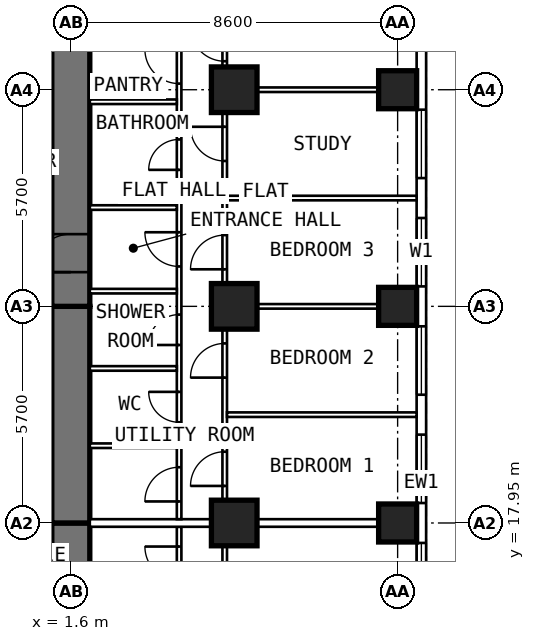
"""IFC4 building model, lengths in metres.
Left out: names, types, materials, properties, quantities, classifications, styles, units other than length and angle.
Written with IfcOpenShell. Run it as: python <this file> out.ifc"""

import sys

from ifc_helpers import new_model, si_unit, direction, frame, frame_2d, origin, origin_2d, place, context, subcontext, project, spatial, rectangle, extrude, element, fill, save


model = new_model("IFC4")
c1 = context("Model", 3, precision=1e-05, world=origin(), true_north=direction((0.0, 1.0)))
c2 = subcontext(c1, "Body", "Model", "MODEL_VIEW")
j1 = project(units=[si_unit("LENGTHUNIT", "METRE"), si_unit("PLANEANGLEUNIT", "RADIAN")], contexts=[c1])
p1 = place(None, origin())
s1 = spatial("IfcSite", under=j1, at=p1, CompositionType="ELEMENT")
p2 = place(p1, origin())
s2 = spatial("IfcBuilding", under=s1, at=p2, CompositionType="ELEMENT")
p3 = place(p2, frame((0.0, 0.0, 46.6)))
s3 = spatial("IfcBuildingStorey", under=s2, at=p3, CompositionType="ELEMENT", Elevation=46.6)
for number, where, z_axis, x_axis in (
    (1, (10.2, 17.95, 0.0), (0.0, 0.0, 1.0), (0.0, 1.0, 0.0)),
    (2, (10.2, 23.65, 0.0), (0.0, 0.0, 1.0), (0.0, 1.0, 0.0)),
    (3, (10.2, 29.35, 0.0), (0.0, 0.0, 1.0), (0.0, 1.0, 0.0)),
):
    element("IfcColumn", number, at=place(p3, frame(where, z_axis=z_axis, x_axis=x_axis)), inside=s3, PredefinedType="COLUMN", context=c2, shape_type="SweptSolid", body=[
        extrude(rectangle(XDim=1.0, YDim=1.0, at=origin_2d()), origin(), (0.0, 0.0, 1.0), 3.6),
    ])
for number, where, z_axis, x_axis in (
    (4, (5.9, 17.95, 0.0), (0.0, 0.0, 1.0), (0.0, 1.0, 0.0)),
    (5, (5.9, 23.65, 0.0), (0.0, 0.0, 1.0), (0.0, 1.0, 0.0)),
    (6, (5.9, 29.35, 0.0), (0.0, 0.0, 1.0), (0.0, 1.0, 0.0)),
):
    element("IfcColumn", number, at=place(p3, frame(where, z_axis=z_axis, x_axis=x_axis)), inside=s3, PredefinedType="COLUMN", context=c2, shape_type="SweptSolid", body=[
        extrude(rectangle(XDim=1.2, YDim=1.2, at=origin_2d()), origin(), (0.0, 0.0, 1.0), 3.6),
    ])
p4 = place(p3, frame((1.6, 9.6, 0.0), z_axis=(0.0, 0.0, 1.0), x_axis=(0.0, 1.0, 0.0)))
e7 = element("IfcWall", 7, at=p4, inside=s3, PredefinedType="SHEAR", context=c2, shape_type="SweptSolid", body=[
    extrude(rectangle(XDim=8.35, YDim=1.0, at=frame_2d((4.175, 0.0))), origin(), (0.0, 0.0, 1.0), 3.6),
])
p5 = place(p4, frame((1.3, 0.0, 0.0)))
e8 = element("IfcOpeningElement", 8, at=p5, cuts=e7, PredefinedType="OPENING", context=c2, shape_type="SweptSolid", body=[
    extrude(rectangle(XDim=1.0, YDim=2.1, at=frame_2d((0.5, 1.05))), frame((0.0, 0.512, 0.0), z_axis=(0.0, -1.0, 0.0), x_axis=(1.0, 0.0, 0.0)), (0.0, 0.0, 1.0), 1.024),
])
p6 = place(p3, frame((1.6, 17.95, 0.0), z_axis=(0.0, 0.0, 1.0), x_axis=(0.0, 1.0, 0.0)))
e9 = element("IfcWall", 9, at=p6, inside=s3, PredefinedType="SHEAR", context=c2, shape_type="SweptSolid", body=[
    extrude(rectangle(XDim=5.7, YDim=1.0, at=frame_2d((2.85, 0.0))), origin(), (0.0, 0.0, 1.0), 3.6),
])
p7 = place(p3, frame((1.6, 23.65, 0.0), z_axis=(0.0, 0.0, 1.0), x_axis=(0.0, 1.0, 0.0)))
e10 = element("IfcWall", 10, at=p7, inside=s3, PredefinedType="SHEAR", context=c2, shape_type="SweptSolid", body=[
    extrude(rectangle(XDim=10.745, YDim=1.0, at=frame_2d((5.373, 0.0))), origin(), (0.0, 0.0, 1.0), 3.6),
])
p8 = place(p7, frame((0.9, 0.0, 0.0)))
e11 = element("IfcOpeningElement", 11, at=p8, cuts=e10, PredefinedType="OPENING", context=c2, shape_type="SweptSolid", body=[
    extrude(rectangle(XDim=1.0, YDim=2.1, at=frame_2d((0.5, 1.05))), frame((0.0, 0.512, 0.0), z_axis=(0.0, -1.0, 0.0), x_axis=(1.0, 0.0, 0.0)), (0.0, 0.0, 1.0), 1.024),
])
p9 = place(p3, frame((10.825, 6.394, 0.0), z_axis=(0.0, 0.0, 1.0), x_axis=(0.0, 1.0, 0.0)))
e12 = element("IfcWall", 12, at=p9, inside=s3, PredefinedType="SOLIDWALL", context=c2, shape_type="SweptSolid", body=[
    extrude(rectangle(XDim=25.241, YDim=0.25, at=frame_2d((12.621, 0.0))), origin(), (0.0, 0.0, 1.0), 3.35),
])
p10 = place(p9, frame((0.681, 0.0, 0.8)))
e13 = element("IfcOpeningElement", 13, at=p10, cuts=e12, PredefinedType="OPENING", context=c2, shape_type="SweptSolid", body=[
    extrude(rectangle(XDim=1.8, YDim=1.8, at=frame_2d((0.9, 0.9))), frame((0.0, 0.137, 0.0), z_axis=(0.0, -1.0, 0.0), x_axis=(1.0, 0.0, 0.0)), (0.0, 0.0, 1.0), 0.274),
])
p11 = place(p9, frame((3.531, 0.0, 0.8)))
e14 = element("IfcOpeningElement", 14, at=p11, cuts=e12, PredefinedType="OPENING", context=c2, shape_type="SweptSolid", body=[
    extrude(rectangle(XDim=1.8, YDim=1.8, at=frame_2d((0.9, 0.9))), frame((0.0, 0.137, 0.0), z_axis=(0.0, -1.0, 0.0), x_axis=(1.0, 0.0, 0.0)), (0.0, 0.0, 1.0), 0.274),
])
p12 = place(p9, frame((6.381, 0.0, 0.8)))
e15 = element("IfcOpeningElement", 15, at=p12, cuts=e12, PredefinedType="OPENING", context=c2, shape_type="SweptSolid", body=[
    extrude(rectangle(XDim=1.8, YDim=1.8, at=frame_2d((0.9, 0.9))), frame((0.0, 0.137, 0.0), z_axis=(0.0, -1.0, 0.0), x_axis=(1.0, 0.0, 0.0)), (0.0, 0.0, 1.0), 0.274),
])
p13 = place(p9, frame((9.231, 0.0, 0.8)))
e16 = element("IfcOpeningElement", 16, at=p13, cuts=e12, PredefinedType="OPENING", context=c2, shape_type="SweptSolid", body=[
    extrude(rectangle(XDim=1.8, YDim=1.8, at=frame_2d((0.9, 0.9))), frame((0.0, 0.137, 0.0), z_axis=(0.0, -1.0, 0.0), x_axis=(1.0, 0.0, 0.0)), (0.0, 0.0, 1.0), 0.274),
])
p14 = place(p9, frame((12.081, 0.0, 0.8)))
e17 = element("IfcOpeningElement", 17, at=p14, cuts=e12, PredefinedType="OPENING", context=c2, shape_type="SweptSolid", body=[
    extrude(rectangle(XDim=1.8, YDim=1.8, at=frame_2d((0.9, 0.9))), frame((0.0, 0.137, 0.0), z_axis=(0.0, -1.0, 0.0), x_axis=(1.0, 0.0, 0.0)), (0.0, 0.0, 1.0), 0.274),
])
p15 = place(p9, frame((14.931, 0.0, 0.8)))
e18 = element("IfcOpeningElement", 18, at=p15, cuts=e12, PredefinedType="OPENING", context=c2, shape_type="SweptSolid", body=[
    extrude(rectangle(XDim=1.8, YDim=1.8, at=frame_2d((0.9, 0.9))), frame((0.0, 0.137, 0.0), z_axis=(0.0, -1.0, 0.0), x_axis=(1.0, 0.0, 0.0)), (0.0, 0.0, 1.0), 0.274),
])
p16 = place(p9, frame((17.781, 0.0, 0.8)))
e19 = element("IfcOpeningElement", 19, at=p16, cuts=e12, PredefinedType="OPENING", context=c2, shape_type="SweptSolid", body=[
    extrude(rectangle(XDim=1.8, YDim=1.8, at=frame_2d((0.9, 0.9))), frame((0.0, 0.137, 0.0), z_axis=(0.0, -1.0, 0.0), x_axis=(1.0, 0.0, 0.0)), (0.0, 0.0, 1.0), 0.274),
])
p17 = place(p9, frame((20.631, 0.0, 0.8)))
e20 = element("IfcOpeningElement", 20, at=p17, cuts=e12, PredefinedType="OPENING", context=c2, shape_type="SweptSolid", body=[
    extrude(rectangle(XDim=1.8, YDim=1.8, at=frame_2d((0.9, 0.9))), frame((0.0, 0.137, 0.0), z_axis=(0.0, -1.0, 0.0), x_axis=(1.0, 0.0, 0.0)), (0.0, 0.0, 1.0), 0.274),
])
p18 = place(p3, frame((4.45, 10.1, 0.0), z_axis=(0.0, 0.0, 1.0), x_axis=(0.0, 1.0, 0.0)))
e21 = element("IfcWall", 21, at=p18, inside=s3, PredefinedType="PARTITIONING", context=c2, shape_type="SweptSolid", body=[
    extrude(rectangle(XDim=7.75, YDim=0.12, at=frame_2d((3.875, 0.0))), origin(), (0.0, 0.0, 1.0), 3.35),
])
p19 = place(p18, frame((0.75, 0.0, 0.0)))
e22 = element("IfcOpeningElement", 22, at=p19, cuts=e21, PredefinedType="OPENING", context=c2, shape_type="SweptSolid", body=[
    extrude(rectangle(XDim=0.9, YDim=2.1, at=frame_2d((0.45, 1.05))), frame((0.0, 0.072, 0.0), z_axis=(0.0, -1.0, 0.0), x_axis=(1.0, 0.0, 0.0)), (0.0, 0.0, 1.0), 0.144),
])
p20 = place(p18, frame((3.705, 0.0, 0.0)))
e23 = element("IfcOpeningElement", 23, at=p20, cuts=e21, PredefinedType="OPENING", context=c2, shape_type="SweptSolid", body=[
    extrude(rectangle(XDim=0.8, YDim=2.1, at=frame_2d((0.4, 1.05))), frame((0.0, 0.072, 0.0), z_axis=(0.0, -1.0, 0.0), x_axis=(1.0, 0.0, 0.0)), (0.0, 0.0, 1.0), 0.144),
])
p21 = place(p18, frame((6.33, 0.0, 0.0)))
e24 = element("IfcOpeningElement", 24, at=p21, cuts=e21, PredefinedType="OPENING", context=c2, shape_type="SweptSolid", body=[
    extrude(rectangle(XDim=0.9, YDim=2.1, at=frame_2d((0.45, 1.05))), frame((0.0, 0.072, 0.0), z_axis=(0.0, -1.0, 0.0), x_axis=(1.0, 0.0, 0.0)), (0.0, 0.0, 1.0), 0.144),
])
p22 = place(p3, frame((5.65, 9.6, 0.0), z_axis=(0.0, 0.0, 1.0), x_axis=(0.0, 1.0, 0.0)))
e25 = element("IfcWall", 25, at=p22, inside=s3, PredefinedType="PARTITIONING", context=c2, shape_type="SweptSolid", body=[
    extrude(rectangle(XDim=8.1, YDim=0.12, at=frame_2d((4.05, 0.0))), origin(), (0.0, 0.0, 1.0), 3.35),
])
p23 = place(p22, frame((5.05, 0.0, 0.0)))
e26 = element("IfcOpeningElement", 26, at=p23, cuts=e25, PredefinedType="OPENING", context=c2, shape_type="SweptSolid", body=[
    extrude(rectangle(XDim=0.9, YDim=2.1, at=frame_2d((0.45, 1.05))), frame((0.0, 0.072, 0.0), z_axis=(0.0, -1.0, 0.0), x_axis=(1.0, 0.0, 0.0)), (0.0, 0.0, 1.0), 0.144),
])
p24 = place(p3, frame((4.45, 18.05, 0.0), z_axis=(0.0, 0.0, 1.0), x_axis=(0.0, 1.0, 0.0)))
e27 = element("IfcWall", 27, at=p24, inside=s3, PredefinedType="PARTITIONING", context=c2, shape_type="SweptSolid", body=[
    extrude(rectangle(XDim=16.345, YDim=0.12, at=frame_2d((8.172, 0.0))), origin(), (0.0, 0.0, 1.0), 3.35),
])
p25 = place(p24, frame((0.467, 0.0, 0.0)))
e28 = element("IfcOpeningElement", 28, at=p25, cuts=e27, PredefinedType="OPENING", context=c2, shape_type="SweptSolid", body=[
    extrude(rectangle(XDim=0.9, YDim=2.1, at=frame_2d((0.45, 1.05))), frame((0.0, 0.072, 0.0), z_axis=(0.0, -1.0, 0.0), x_axis=(1.0, 0.0, 0.0)), (0.0, 0.0, 1.0), 0.144),
])
p26 = place(p24, frame((2.55, 0.0, 0.0)))
e29 = element("IfcOpeningElement", 29, at=p26, cuts=e27, PredefinedType="OPENING", context=c2, shape_type="SweptSolid", body=[
    extrude(rectangle(XDim=0.8, YDim=2.1, at=frame_2d((0.4, 1.05))), frame((0.0, 0.072, 0.0), z_axis=(0.0, -1.0, 0.0), x_axis=(1.0, 0.0, 0.0)), (0.0, 0.0, 1.0), 0.144),
])
p27 = place(p24, frame((4.583, 0.0, 0.0)))
e30 = element("IfcOpeningElement", 30, at=p27, cuts=e27, PredefinedType="OPENING", context=c2, shape_type="SweptSolid", body=[
    extrude(rectangle(XDim=0.8, YDim=2.1, at=frame_2d((0.4, 1.05))), frame((0.0, 0.072, 0.0), z_axis=(0.0, -1.0, 0.0), x_axis=(1.0, 0.0, 0.0)), (0.0, 0.0, 1.0), 0.144),
])
p28 = place(p24, frame((6.65, 0.0, 0.0)))
e31 = element("IfcOpeningElement", 31, at=p28, cuts=e27, PredefinedType="OPENING", context=c2, shape_type="SweptSolid", body=[
    extrude(rectangle(XDim=0.9, YDim=2.1, at=frame_2d((0.45, 1.05))), frame((0.0, 0.072, 0.0), z_axis=(0.0, -1.0, 0.0), x_axis=(1.0, 0.0, 0.0)), (0.0, 0.0, 1.0), 0.144),
])
p29 = place(p24, frame((9.192, 0.0, 0.0)))
e32 = element("IfcOpeningElement", 32, at=p29, cuts=e27, PredefinedType="OPENING", context=c2, shape_type="SweptSolid", body=[
    extrude(rectangle(XDim=0.8, YDim=2.1, at=frame_2d((0.4, 1.05))), frame((0.0, 0.072, 0.0), z_axis=(0.0, -1.0, 0.0), x_axis=(1.0, 0.0, 0.0)), (0.0, 0.0, 1.0), 0.144),
])
p30 = place(p24, frame((11.461, 0.0, 0.0)))
e33 = element("IfcOpeningElement", 33, at=p30, cuts=e27, PredefinedType="OPENING", context=c2, shape_type="SweptSolid", body=[
    extrude(rectangle(XDim=0.9, YDim=2.1, at=frame_2d((0.45, 1.05))), frame((0.0, 0.072, 0.0), z_axis=(0.0, -1.0, 0.0), x_axis=(1.0, 0.0, 0.0)), (0.0, 0.0, 1.0), 0.144),
])
p31 = place(p24, frame((13.367, 0.0, 0.0)))
e34 = element("IfcOpeningElement", 34, at=p31, cuts=e27, PredefinedType="OPENING", context=c2, shape_type="SweptSolid", body=[
    extrude(rectangle(XDim=0.8, YDim=2.1, at=frame_2d((0.4, 1.05))), frame((0.0, 0.072, 0.0), z_axis=(0.0, -1.0, 0.0), x_axis=(1.0, 0.0, 0.0)), (0.0, 0.0, 1.0), 0.144),
])
p32 = place(p24, frame((14.854, 0.0, 0.0)))
e35 = element("IfcOpeningElement", 35, at=p32, cuts=e27, PredefinedType="OPENING", context=c2, shape_type="SweptSolid", body=[
    extrude(rectangle(XDim=0.9, YDim=2.1, at=frame_2d((0.45, 1.05))), frame((0.0, 0.072, 0.0), z_axis=(0.0, -1.0, 0.0), x_axis=(1.0, 0.0, 0.0)), (0.0, 0.0, 1.0), 0.144),
])
p33 = place(p3, frame((5.65, 18.05, 0.0), z_axis=(0.0, 0.0, 1.0), x_axis=(0.0, 1.0, 0.0)))
e36 = element("IfcWall", 36, at=p33, inside=s3, PredefinedType="PARTITIONING", context=c2, shape_type="SweptSolid", body=[
    extrude(rectangle(XDim=16.345, YDim=0.12, at=frame_2d((8.172, 0.0))), origin(), (0.0, 0.0, 1.0), 3.35),
])
p34 = place(p33, frame((0.875, 0.0, 0.0)))
e37 = element("IfcOpeningElement", 37, at=p34, cuts=e36, PredefinedType="OPENING", context=c2, shape_type="SweptSolid", body=[
    extrude(rectangle(XDim=0.9, YDim=2.1, at=frame_2d((0.45, 1.05))), frame((0.0, 0.072, 0.0), z_axis=(0.0, -1.0, 0.0), x_axis=(1.0, 0.0, 0.0)), (0.0, 0.0, 1.0), 0.144),
])
p35 = place(p33, frame((3.725, 0.0, 0.0)))
e38 = element("IfcOpeningElement", 38, at=p35, cuts=e36, PredefinedType="OPENING", context=c2, shape_type="SweptSolid", body=[
    extrude(rectangle(XDim=0.9, YDim=2.1, at=frame_2d((0.45, 1.05))), frame((0.0, 0.072, 0.0), z_axis=(0.0, -1.0, 0.0), x_axis=(1.0, 0.0, 0.0)), (0.0, 0.0, 1.0), 0.144),
])
p36 = place(p33, frame((6.575, 0.0, 0.0)))
e39 = element("IfcOpeningElement", 39, at=p36, cuts=e36, PredefinedType="OPENING", context=c2, shape_type="SweptSolid", body=[
    extrude(rectangle(XDim=0.9, YDim=2.1, at=frame_2d((0.45, 1.05))), frame((0.0, 0.072, 0.0), z_axis=(0.0, -1.0, 0.0), x_axis=(1.0, 0.0, 0.0)), (0.0, 0.0, 1.0), 0.144),
])
p37 = place(p33, frame((9.425, 0.0, 0.0)))
e40 = element("IfcOpeningElement", 40, at=p37, cuts=e36, PredefinedType="OPENING", context=c2, shape_type="SweptSolid", body=[
    extrude(rectangle(XDim=0.9, YDim=2.1, at=frame_2d((0.45, 1.05))), frame((0.0, 0.072, 0.0), z_axis=(0.0, -1.0, 0.0), x_axis=(1.0, 0.0, 0.0)), (0.0, 0.0, 1.0), 0.144),
])
p38 = place(p33, frame((12.05, 0.0, 0.0)))
e41 = element("IfcOpeningElement", 41, at=p38, cuts=e36, PredefinedType="OPENING", context=c2, shape_type="SweptSolid", body=[
    extrude(rectangle(XDim=0.9, YDim=2.1, at=frame_2d((0.45, 1.05))), frame((0.0, 0.072, 0.0), z_axis=(0.0, -1.0, 0.0), x_axis=(1.0, 0.0, 0.0)), (0.0, 0.0, 1.0), 0.144),
])
p39 = place(p3, frame((5.71, 20.8, 0.0), z_axis=(0.0, 0.0, 1.0), x_axis=(1.0, 0.0, 0.0)))
e42 = element("IfcWall", 42, at=p39, inside=s3, PredefinedType="PARTITIONING", context=c2, shape_type="SweptSolid", body=[
    extrude(rectangle(XDim=4.99, YDim=0.12, at=frame_2d((2.495, 0.0))), origin(), (0.0, 0.0, 1.0), 3.35),
])
p40 = place(p3, frame((5.71, 23.65, 0.0), z_axis=(0.0, 0.0, 1.0), x_axis=(1.0, 0.0, 0.0)))
e43 = element("IfcWall", 43, at=p40, inside=s3, PredefinedType="PARTITIONING", context=c2, shape_type="SweptSolid", body=[
    extrude(rectangle(XDim=4.99, YDim=0.12, at=frame_2d((2.495, 0.0))), origin(), (0.0, 0.0, 1.0), 2.45),
])
p41 = place(p3, frame((5.71, 26.5, 0.0), z_axis=(0.0, 0.0, 1.0), x_axis=(1.0, 0.0, 0.0)))
e44 = element("IfcWall", 44, at=p41, inside=s3, PredefinedType="PARTITIONING", context=c2, shape_type="SweptSolid", body=[
    extrude(rectangle(XDim=4.99, YDim=0.12, at=frame_2d((2.495, 0.0))), origin(), (0.0, 0.0, 1.0), 3.35),
])
p42 = place(p3, frame((5.71, 29.35, 0.0), z_axis=(0.0, 0.0, 1.0), x_axis=(1.0, 0.0, 0.0)))
e45 = element("IfcWall", 45, at=p42, inside=s3, PredefinedType="PARTITIONING", context=c2, shape_type="SweptSolid", body=[
    extrude(rectangle(XDim=4.99, YDim=0.12, at=frame_2d((2.495, 0.0))), origin(), (0.0, 0.0, 1.0), 2.45),
])
for number, where, z_axis, x_axis in (
    (46, (2.1, 19.983, 0.0), (0.0, 0.0, 1.0), (1.0, 0.0, 0.0)),
    (47, (2.1, 22.017, 0.0), (0.0, 0.0, 1.0), (1.0, 0.0, 0.0)),
    (48, (2.1, 24.05, 0.0), (0.0, 0.0, 1.0), (1.0, 0.0, 0.0)),
    (49, (2.1, 26.25, 0.0), (0.0, 0.0, 1.0), (1.0, 0.0, 0.0)),
):
    element("IfcWall", number, at=place(p3, frame(where, z_axis=z_axis, x_axis=x_axis)), inside=s3, PredefinedType="PARTITIONING", context=c2, shape_type="SweptSolid", body=[
        extrude(rectangle(XDim=2.29, YDim=0.12, at=frame_2d((1.145, 0.0))), origin(), (0.0, 0.0, 1.0), 3.35),
    ])
p43 = place(p3, frame((2.1, 29.033, 0.0), z_axis=(0.0, 0.0, 1.0), x_axis=(1.0, 0.0, 0.0)))
e50 = element("IfcWall", 50, at=p43, inside=s3, PredefinedType="PARTITIONING", context=c2, shape_type="SweptSolid", body=[
    extrude(rectangle(XDim=2.29, YDim=0.12, at=frame_2d((1.145, 0.0))), origin(), (0.0, 0.0, 1.0), 2.45),
])
p44 = place(p3, frame((2.1, 17.95, 0.0), z_axis=(0.0, 0.0, 1.0), x_axis=(1.0, 0.0, 0.0)))
e51 = element("IfcWall", 51, at=p44, inside=s3, PredefinedType="PARTITIONING", context=c2, shape_type="SweptSolid", body=[
    extrude(rectangle(XDim=8.6, YDim=0.2, at=frame_2d((4.3, 0.0))), origin(), (0.0, 0.0, 1.0), 2.45),
])
p45 = place(p13, origin())
e52 = element("IfcWindow", 52, at=p45, inside=s3, PartitioningType="SINGLE_PANEL", PredefinedType="WINDOW", context=c2, shape_type="SweptSolid", body=[
    extrude(rectangle(XDim=1.8, YDim=1.8, at=frame_2d((0.9, 0.9))), frame((0.0, 0.03, 0.0), z_axis=(0.0, -1.0, 0.0), x_axis=(1.0, 0.0, 0.0)), (0.0, 0.0, 1.0), 0.06),
])
fill(e16, e52)
p46 = place(p14, origin())
e53 = element("IfcWindow", 53, at=p46, inside=s3, PartitioningType="SINGLE_PANEL", PredefinedType="WINDOW", context=c2, shape_type="SweptSolid", body=[
    extrude(rectangle(XDim=1.8, YDim=1.8, at=frame_2d((0.9, 0.9))), frame((0.0, 0.03, 0.0), z_axis=(0.0, -1.0, 0.0), x_axis=(1.0, 0.0, 0.0)), (0.0, 0.0, 1.0), 0.06),
])
fill(e17, e53)
p47 = place(p15, origin())
e54 = element("IfcWindow", 54, at=p47, inside=s3, PartitioningType="SINGLE_PANEL", PredefinedType="WINDOW", context=c2, shape_type="SweptSolid", body=[
    extrude(rectangle(XDim=1.8, YDim=1.8, at=frame_2d((0.9, 0.9))), frame((0.0, 0.03, 0.0), z_axis=(0.0, -1.0, 0.0), x_axis=(1.0, 0.0, 0.0)), (0.0, 0.0, 1.0), 0.06),
])
fill(e18, e54)
p48 = place(p16, origin())
e55 = element("IfcWindow", 55, at=p48, inside=s3, PartitioningType="SINGLE_PANEL", PredefinedType="WINDOW", context=c2, shape_type="SweptSolid", body=[
    extrude(rectangle(XDim=1.8, YDim=1.8, at=frame_2d((0.9, 0.9))), frame((0.0, 0.03, 0.0), z_axis=(0.0, -1.0, 0.0), x_axis=(1.0, 0.0, 0.0)), (0.0, 0.0, 1.0), 0.06),
])
fill(e19, e55)
p49 = place(p17, origin())
e56 = element("IfcWindow", 56, at=p49, inside=s3, PartitioningType="SINGLE_PANEL", PredefinedType="WINDOW", context=c2, shape_type="SweptSolid", body=[
    extrude(rectangle(XDim=1.8, YDim=1.8, at=frame_2d((0.9, 0.9))), frame((0.0, 0.03, 0.0), z_axis=(0.0, -1.0, 0.0), x_axis=(1.0, 0.0, 0.0)), (0.0, 0.0, 1.0), 0.06),
])
fill(e20, e56)
p50 = place(p21, origin())
e57 = element("IfcDoor", 57, at=p50, inside=s3, OperationType="SINGLE_SWING_RIGHT", PredefinedType="DOOR", context=c2, shape_type="SweptSolid", body=[
    extrude(rectangle(XDim=0.9, YDim=2.1, at=frame_2d((0.45, 1.05))), frame((0.0, 0.025, 0.0), z_axis=(0.0, -1.0, 0.0), x_axis=(1.0, 0.0, 0.0)), (0.0, 0.0, 1.0), 0.05),
])
fill(e24, e57)
p51 = place(p8, origin())
e58 = element("IfcDoor", 58, at=p51, inside=s3, OperationType="SINGLE_SWING_LEFT", PredefinedType="DOOR", context=c2, shape_type="SweptSolid", body=[
    extrude(rectangle(XDim=1.0, YDim=2.1, at=frame_2d((0.5, 1.05))), frame((0.0, 0.25, 0.0), z_axis=(0.0, -1.0, 0.0), x_axis=(1.0, 0.0, 0.0)), (0.0, 0.0, 1.0), 0.5),
])
fill(e11, e58)
p52 = place(p34, origin())
e59 = element("IfcDoor", 59, at=p52, inside=s3, OperationType="SINGLE_SWING_LEFT", PredefinedType="DOOR", context=c2, shape_type="SweptSolid", body=[
    extrude(rectangle(XDim=0.9, YDim=2.1, at=frame_2d((0.45, 1.05))), frame((0.0, 0.025, 0.0), z_axis=(0.0, -1.0, 0.0), x_axis=(1.0, 0.0, 0.0)), (0.0, 0.0, 1.0), 0.05),
])
fill(e37, e59)
p53 = place(p35, origin())
e60 = element("IfcDoor", 60, at=p53, inside=s3, OperationType="SINGLE_SWING_LEFT", PredefinedType="DOOR", context=c2, shape_type="SweptSolid", body=[
    extrude(rectangle(XDim=0.9, YDim=2.1, at=frame_2d((0.45, 1.05))), frame((0.0, 0.025, 0.0), z_axis=(0.0, -1.0, 0.0), x_axis=(1.0, 0.0, 0.0)), (0.0, 0.0, 1.0), 0.05),
])
fill(e38, e60)
p54 = place(p36, origin())
e61 = element("IfcDoor", 61, at=p54, inside=s3, OperationType="SINGLE_SWING_LEFT", PredefinedType="DOOR", context=c2, shape_type="SweptSolid", body=[
    extrude(rectangle(XDim=0.9, YDim=2.1, at=frame_2d((0.45, 1.05))), frame((0.0, 0.025, 0.0), z_axis=(0.0, -1.0, 0.0), x_axis=(1.0, 0.0, 0.0)), (0.0, 0.0, 1.0), 0.05),
])
fill(e39, e61)
p55 = place(p37, origin())
e62 = element("IfcDoor", 62, at=p55, inside=s3, OperationType="SINGLE_SWING_RIGHT", PredefinedType="DOOR", context=c2, shape_type="SweptSolid", body=[
    extrude(rectangle(XDim=0.9, YDim=2.1, at=frame_2d((0.45, 1.05))), frame((0.0, 0.025, 0.0), z_axis=(0.0, -1.0, 0.0), x_axis=(1.0, 0.0, 0.0)), (0.0, 0.0, 1.0), 0.05),
])
fill(e40, e62)
p56 = place(p38, origin())
e63 = element("IfcDoor", 63, at=p56, inside=s3, OperationType="SINGLE_SWING_RIGHT", PredefinedType="DOOR", context=c2, shape_type="SweptSolid", body=[
    extrude(rectangle(XDim=0.9, YDim=2.1, at=frame_2d((0.45, 1.05))), frame((0.0, 0.025, 0.0), z_axis=(0.0, -1.0, 0.0), x_axis=(1.0, 0.0, 0.0)), (0.0, 0.0, 1.0), 0.05),
])
fill(e41, e63)
p57 = place(p25, origin())
e64 = element("IfcDoor", 64, at=p57, inside=s3, OperationType="SINGLE_SWING_LEFT", PredefinedType="DOOR", context=c2, shape_type="SweptSolid", body=[
    extrude(rectangle(XDim=0.9, YDim=2.1, at=frame_2d((0.45, 1.05))), frame((0.0, 0.025, 0.0), z_axis=(0.0, -1.0, 0.0), x_axis=(1.0, 0.0, 0.0)), (0.0, 0.0, 1.0), 0.05),
])
fill(e28, e64)
p58 = place(p26, origin())
e65 = element("IfcDoor", 65, at=p58, inside=s3, OperationType="SINGLE_SWING_RIGHT", PredefinedType="DOOR", context=c2, shape_type="SweptSolid", body=[
    extrude(rectangle(XDim=0.8, YDim=2.1, at=frame_2d((0.4, 1.05))), frame((0.0, 0.025, 0.0), z_axis=(0.0, -1.0, 0.0), x_axis=(1.0, 0.0, 0.0)), (0.0, 0.0, 1.0), 0.05),
])
fill(e29, e65)
p59 = place(p27, origin())
e66 = element("IfcDoor", 66, at=p59, inside=s3, OperationType="SINGLE_SWING_LEFT", PredefinedType="DOOR", context=c2, shape_type="SweptSolid", body=[
    extrude(rectangle(XDim=0.8, YDim=2.1, at=frame_2d((0.4, 1.05))), frame((0.0, 0.025, 0.0), z_axis=(0.0, -1.0, 0.0), x_axis=(1.0, 0.0, 0.0)), (0.0, 0.0, 1.0), 0.05),
])
fill(e30, e66)
p60 = place(p28, origin())
e67 = element("IfcDoor", 67, at=p60, inside=s3, OperationType="SINGLE_SWING_RIGHT", PredefinedType="DOOR", context=c2, shape_type="SweptSolid", body=[
    extrude(rectangle(XDim=0.9, YDim=2.1, at=frame_2d((0.45, 1.05))), frame((0.0, 0.025, 0.0), z_axis=(0.0, -1.0, 0.0), x_axis=(1.0, 0.0, 0.0)), (0.0, 0.0, 1.0), 0.05),
])
fill(e31, e67)
p61 = place(p29, origin())
e68 = element("IfcDoor", 68, at=p61, inside=s3, OperationType="SINGLE_SWING_LEFT", PredefinedType="DOOR", context=c2, shape_type="SweptSolid", body=[
    extrude(rectangle(XDim=0.8, YDim=2.1, at=frame_2d((0.4, 1.05))), frame((0.0, 0.025, 0.0), z_axis=(0.0, -1.0, 0.0), x_axis=(1.0, 0.0, 0.0)), (0.0, 0.0, 1.0), 0.05),
])
fill(e32, e68)
p62 = place(p30, origin())
e69 = element("IfcDoor", 69, at=p62, inside=s3, OperationType="SINGLE_SWING_RIGHT", PredefinedType="DOOR", context=c2, shape_type="SweptSolid", body=[
    extrude(rectangle(XDim=0.9, YDim=2.1, at=frame_2d((0.45, 1.05))), frame((0.0, 0.025, 0.0), z_axis=(0.0, -1.0, 0.0), x_axis=(1.0, 0.0, 0.0)), (0.0, 0.0, 1.0), 0.05),
])
fill(e33, e69)
save(model, sys.argv[1])
